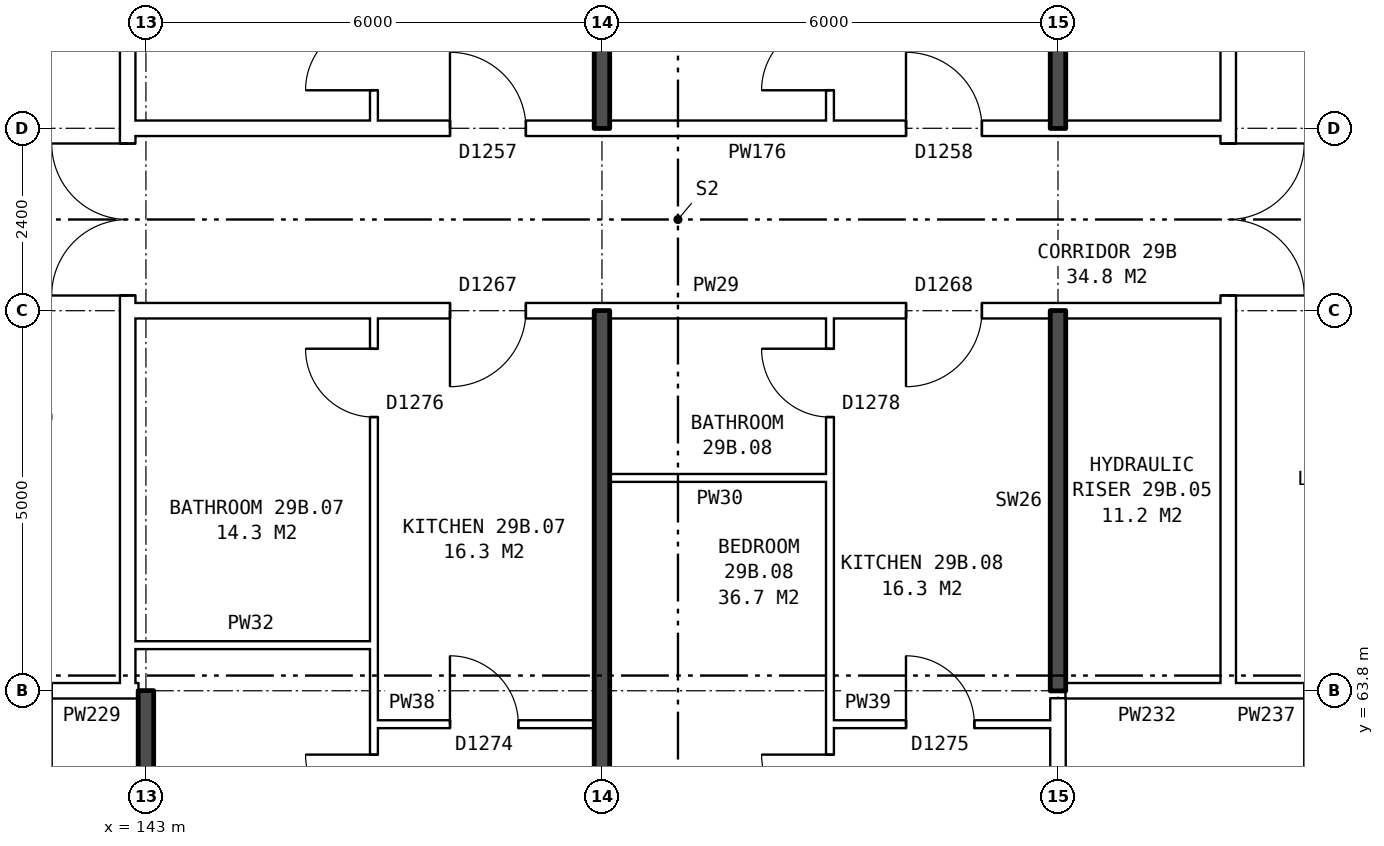
"""IFC4 building model, lengths in metres.
Left out: names, types, materials, properties, quantities, classifications, styles, units other than length and angle.
Written with IfcOpenShell. Run it as: python <this file> out.ifc"""

import sys

from ifc_helpers import new_model, si_unit, direction, frame, frame_2d, origin, place, context, subcontext, project, spatial, rectangle, extrude, element, fill, save


model = new_model("IFC4")
c1 = context("Model", 3, precision=1e-05, world=origin(), true_north=direction((0.0, 1.0)))
c2 = subcontext(c1, "Body", "Model", "MODEL_VIEW")
j1 = project(units=[si_unit("LENGTHUNIT", "METRE"), si_unit("PLANEANGLEUNIT", "RADIAN")], contexts=[c1])
p1 = place(None, origin())
s1 = spatial("IfcSite", under=j1, at=p1, CompositionType="ELEMENT")
p2 = place(p1, origin())
s2 = spatial("IfcBuilding", under=s1, at=p2, CompositionType="ELEMENT")
p3 = place(p2, frame((0.0, 0.0, 105.7)))
s3 = spatial("IfcBuildingStorey", under=s2, at=p3, CompositionType="ELEMENT", Elevation=105.7)
p4 = place(p3, frame((142.76, 63.9, 0.0), z_axis=(0.0, 0.0, 1.0), x_axis=(0.0, 1.0, 0.0)))
e1 = element("IfcWall", 1, at=p4, inside=s3, PredefinedType="PARTITIONING", context=c2, shape_type="SweptSolid", body=[
    extrude(rectangle(XDim=12.2, YDim=0.2, at=frame_2d((6.1, 0.0))), origin(), (0.0, 0.0, 1.0), 2.85),
])
p5 = place(p4, frame((5.1, 0.0, 0.0)))
e2 = element("IfcOpeningElement", 2, at=p5, cuts=e1, PredefinedType="OPENING", context=c2, shape_type="SweptSolid", body=[
    extrude(rectangle(XDim=2.0, YDim=2.1, at=frame_2d((1.0, 1.05))), frame((0.0, 0.11, 0.0), z_axis=(0.0, -1.0, 0.0), x_axis=(1.0, 0.0, 0.0)), (0.0, 0.0, 1.0), 0.22),
])
p6 = place(p3, frame((157.24, 63.9, 0.0), z_axis=(0.0, 0.0, 1.0), x_axis=(0.0, 1.0, 0.0)))
e3 = element("IfcWall", 3, at=p6, inside=s3, PredefinedType="PARTITIONING", context=c2, shape_type="SweptSolid", body=[
    extrude(rectangle(XDim=12.2, YDim=0.2, at=frame_2d((6.1, 0.0))), origin(), (0.0, 0.0, 1.0), 2.85),
])
p7 = place(p6, frame((5.1, 0.0, 0.0)))
e4 = element("IfcOpeningElement", 4, at=p7, cuts=e3, PredefinedType="OPENING", context=c2, shape_type="SweptSolid", body=[
    extrude(rectangle(XDim=2.0, YDim=2.1, at=frame_2d((1.0, 1.05))), frame((0.0, 0.11, 0.0), z_axis=(0.0, -1.0, 0.0), x_axis=(1.0, 0.0, 0.0)), (0.0, 0.0, 1.0), 0.22),
])
p8 = place(p3, frame((146.0, 63.36, 0.0), z_axis=(0.0, 0.0, 1.0), x_axis=(1.0, 0.0, 0.0)))
e5 = element("IfcWall", 5, at=p8, inside=s3, PredefinedType="PARTITIONING", context=c2, shape_type="SweptSolid", body=[
    extrude(rectangle(XDim=2.9, YDim=0.1, at=frame_2d((1.45, 0.0))), origin(), (0.0, 0.0, 1.0), 2.85),
])
p9 = place(p8, frame((1.0, 0.0, 0.0)))
e6 = element("IfcOpeningElement", 6, at=p9, cuts=e5, PredefinedType="OPENING", context=c2, shape_type="SweptSolid", body=[
    extrude(rectangle(XDim=0.9, YDim=2.1, at=frame_2d((0.45, 1.05))), frame((0.0, 0.06, 0.0), z_axis=(0.0, -1.0, 0.0), x_axis=(1.0, 0.0, 0.0)), (0.0, 0.0, 1.0), 0.12),
])
p10 = place(p3, frame((152.0, 63.36, 0.0), z_axis=(0.0, 0.0, 1.0), x_axis=(1.0, 0.0, 0.0)))
e7 = element("IfcWall", 7, at=p10, inside=s3, PredefinedType="PARTITIONING", context=c2, shape_type="SweptSolid", body=[
    extrude(rectangle(XDim=2.9, YDim=0.1, at=frame_2d((1.45, 0.0))), origin(), (0.0, 0.0, 1.0), 2.85),
])
p11 = place(p10, frame((1.0, 0.0, 0.0)))
e8 = element("IfcOpeningElement", 8, at=p11, cuts=e7, PredefinedType="OPENING", context=c2, shape_type="SweptSolid", body=[
    extrude(rectangle(XDim=0.9, YDim=2.1, at=frame_2d((0.45, 1.05))), frame((0.0, 0.06, 0.0), z_axis=(0.0, -1.0, 0.0), x_axis=(1.0, 0.0, 0.0)), (0.0, 0.0, 1.0), 0.12),
])
p12 = place(p3, frame((139.76, 63.8, 0.0), z_axis=(0.0, 0.0, 1.0), x_axis=(1.0, 0.0, 0.0)))
e9 = element("IfcWall", 9, at=p12, inside=s3, PredefinedType="PARTITIONING", context=c2, shape_type="SweptSolid", body=[
    extrude(rectangle(XDim=3.0, YDim=0.2, at=frame_2d((1.5, 0.0))), origin(), (0.0, 0.0, 1.0), 2.85),
])
p13 = place(p12, frame((1.0, 0.0, 0.0)))
e10 = element("IfcOpeningElement", 10, at=p13, cuts=e9, PredefinedType="OPENING", context=c2, shape_type="SweptSolid", body=[
    extrude(rectangle(XDim=1.0, YDim=2.1, at=frame_2d((0.5, 1.05))), frame((0.0, 0.11, 0.0), z_axis=(0.0, -1.0, 0.0), x_axis=(1.0, 0.0, 0.0)), (0.0, 0.0, 1.0), 0.22),
])
p14 = place(p3, frame((142.76, 63.8, 0.0), z_axis=(0.0, 0.0, 1.0), x_axis=(1.0, 0.0, 0.0)))
e11 = element("IfcWall", 11, at=p14, inside=s3, PredefinedType="PARTITIONING", context=c2, shape_type="SweptSolid", body=[
    extrude(rectangle(XDim=0.14, YDim=0.2, at=frame_2d((0.07, 0.0))), origin(), (0.0, 0.0, 1.0), 2.85),
])
p15 = place(p3, frame((155.1, 63.8, 0.0), z_axis=(0.0, 0.0, 1.0), x_axis=(1.0, 0.0, 0.0)))
e12 = element("IfcWall", 12, at=p15, inside=s3, PredefinedType="PARTITIONING", context=c2, shape_type="SweptSolid", body=[
    extrude(rectangle(XDim=2.14, YDim=0.2, at=frame_2d((1.07, 0.0))), origin(), (0.0, 0.0, 1.0), 2.85),
])
p16 = place(p3, frame((157.24, 63.8, 0.0), z_axis=(0.0, 0.0, 1.0), x_axis=(1.0, 0.0, 0.0)))
e13 = element("IfcWall", 13, at=p16, inside=s3, PredefinedType="PARTITIONING", context=c2, shape_type="SweptSolid", body=[
    extrude(rectangle(XDim=3.0, YDim=0.2, at=frame_2d((1.5, 0.0))), origin(), (0.0, 0.0, 1.0), 2.85),
])
p17 = place(p16, frame((1.0, 0.0, 0.0)))
e14 = element("IfcOpeningElement", 14, at=p17, cuts=e13, PredefinedType="OPENING", context=c2, shape_type="SweptSolid", body=[
    extrude(rectangle(XDim=1.0, YDim=2.1, at=frame_2d((0.5, 1.05))), frame((0.0, 0.11, 0.0), z_axis=(0.0, -1.0, 0.0), x_axis=(1.0, 0.0, 0.0)), (0.0, 0.0, 1.0), 0.22),
])
p18 = place(p3, frame((142.76, 64.4, 0.0), z_axis=(0.0, 0.0, 1.0), x_axis=(1.0, 0.0, 0.0)))
e15 = element("IfcWall", 15, at=p18, inside=s3, PredefinedType="PARTITIONING", context=c2, shape_type="SweptSolid", body=[
    extrude(rectangle(XDim=3.24, YDim=0.1, at=frame_2d((1.62, 0.0))), origin(), (0.0, 0.0, 1.0), 2.85),
])
p19 = place(p3, frame((149.1, 66.6, 0.0), z_axis=(0.0, 0.0, 1.0), x_axis=(1.0, 0.0, 0.0)))
e16 = element("IfcWall", 16, at=p19, inside=s3, PredefinedType="PARTITIONING", context=c2, shape_type="SweptSolid", body=[
    extrude(rectangle(XDim=2.9, YDim=0.1, at=frame_2d((1.45, 0.0))), origin(), (0.0, 0.0, 1.0), 2.85),
])
p20 = place(p3, frame((142.76, 68.8, 0.0), z_axis=(0.0, 0.0, 1.0), x_axis=(1.0, 0.0, 0.0)))
e17 = element("IfcWall", 17, at=p20, inside=s3, PredefinedType="PARTITIONING", context=c2, shape_type="SweptSolid", body=[
    extrude(rectangle(XDim=14.48, YDim=0.2, at=frame_2d((7.24, 0.0))), origin(), (0.0, 0.0, 1.0), 2.85),
])
p21 = place(p20, frame((4.24, 0.0, 0.0)))
e18 = element("IfcOpeningElement", 18, at=p21, cuts=e17, PredefinedType="OPENING", context=c2, shape_type="SweptSolid", body=[
    extrude(rectangle(XDim=1.0, YDim=2.1, at=frame_2d((0.5, 1.05))), frame((0.0, 0.11, 0.0), z_axis=(0.0, -1.0, 0.0), x_axis=(1.0, 0.0, 0.0)), (0.0, 0.0, 1.0), 0.22),
])
p22 = place(p20, frame((10.24, 0.0, 0.0)))
e19 = element("IfcOpeningElement", 19, at=p22, cuts=e17, PredefinedType="OPENING", context=c2, shape_type="SweptSolid", body=[
    extrude(rectangle(XDim=1.0, YDim=2.1, at=frame_2d((0.5, 1.05))), frame((0.0, 0.11, 0.0), z_axis=(0.0, -1.0, 0.0), x_axis=(1.0, 0.0, 0.0)), (0.0, 0.0, 1.0), 0.22),
])
p23 = place(p3, frame((142.76, 71.2, 0.0), z_axis=(0.0, 0.0, 1.0), x_axis=(1.0, 0.0, 0.0)))
e20 = element("IfcWall", 20, at=p23, inside=s3, PredefinedType="PARTITIONING", context=c2, shape_type="SweptSolid", body=[
    extrude(rectangle(XDim=14.48, YDim=0.2, at=frame_2d((7.24, 0.0))), origin(), (0.0, 0.0, 1.0), 2.85),
])
p24 = place(p23, frame((4.24, 0.0, 0.0)))
e21 = element("IfcOpeningElement", 21, at=p24, cuts=e20, PredefinedType="OPENING", context=c2, shape_type="SweptSolid", body=[
    extrude(rectangle(XDim=1.0, YDim=2.1, at=frame_2d((0.5, 1.05))), frame((0.0, 0.11, 0.0), z_axis=(0.0, -1.0, 0.0), x_axis=(1.0, 0.0, 0.0)), (0.0, 0.0, 1.0), 0.22),
])
p25 = place(p23, frame((10.24, 0.0, 0.0)))
e22 = element("IfcOpeningElement", 22, at=p25, cuts=e20, PredefinedType="OPENING", context=c2, shape_type="SweptSolid", body=[
    extrude(rectangle(XDim=1.0, YDim=2.1, at=frame_2d((0.5, 1.05))), frame((0.0, 0.11, 0.0), z_axis=(0.0, -1.0, 0.0), x_axis=(1.0, 0.0, 0.0)), (0.0, 0.0, 1.0), 0.22),
])
p26 = place(p3, frame((143.0, 54.36, 0.0), z_axis=(0.0, 0.0, 1.0), x_axis=(0.0, 1.0, 0.0)))
e23 = element("IfcWall", 23, at=p26, inside=s3, PredefinedType="SOLIDWALL", context=c2, shape_type="SweptSolid", body=[
    extrude(rectangle(XDim=9.44, YDim=0.2, at=frame_2d((4.72, 0.0))), origin(), (0.0, 0.0, 1.0), 2.85),
])
p27 = place(p3, frame((146.0, 54.36, 0.0), z_axis=(0.0, 0.0, 1.0), x_axis=(0.0, 1.0, 0.0)))
e24 = element("IfcWall", 24, at=p27, inside=s3, PredefinedType="PARTITIONING", context=c2, shape_type="SweptSolid", body=[
    extrude(rectangle(XDim=14.34, YDim=0.1, at=frame_2d((7.17, 0.0))), origin(), (0.0, 0.0, 1.0), 2.85),
])
p28 = place(p27, frame((7.7, 0.0, 0.0)))
e25 = element("IfcOpeningElement", 25, at=p28, cuts=e24, PredefinedType="OPENING", context=c2, shape_type="SweptSolid", body=[
    extrude(rectangle(XDim=0.9, YDim=2.1, at=frame_2d((0.45, 1.05))), frame((0.0, 0.06, 0.0), z_axis=(0.0, -1.0, 0.0), x_axis=(1.0, 0.0, 0.0)), (0.0, 0.0, 1.0), 0.12),
])
p29 = place(p27, frame((13.04, 0.0, 0.0)))
e26 = element("IfcOpeningElement", 26, at=p29, cuts=e24, PredefinedType="OPENING", context=c2, shape_type="SweptSolid", body=[
    extrude(rectangle(XDim=0.9, YDim=2.1, at=frame_2d((0.45, 1.05))), frame((0.0, 0.06, 0.0), z_axis=(0.0, -1.0, 0.0), x_axis=(1.0, 0.0, 0.0)), (0.0, 0.0, 1.0), 0.12),
])
p30 = place(p3, frame((146.0, 71.3, 0.0), z_axis=(0.0, 0.0, 1.0), x_axis=(0.0, 1.0, 0.0)))
e27 = element("IfcWall", 27, at=p30, inside=s3, PredefinedType="PARTITIONING", context=c2, shape_type="SweptSolid", body=[
    extrude(rectangle(XDim=14.34, YDim=0.1, at=frame_2d((7.17, 0.0))), origin(), (0.0, 0.0, 1.0), 2.85),
])
p31 = place(p30, frame((7.94, 0.0, 0.0)))
e28 = element("IfcOpeningElement", 28, at=p31, cuts=e27, PredefinedType="OPENING", context=c2, shape_type="SweptSolid", body=[
    extrude(rectangle(XDim=0.9, YDim=2.1, at=frame_2d((0.45, 1.05))), frame((0.0, 0.06, 0.0), z_axis=(0.0, -1.0, 0.0), x_axis=(1.0, 0.0, 0.0)), (0.0, 0.0, 1.0), 0.12),
])
p32 = place(p30, frame((0.4, 0.0, 0.0)))
e29 = element("IfcOpeningElement", 29, at=p32, cuts=e27, PredefinedType="OPENING", context=c2, shape_type="SweptSolid", body=[
    extrude(rectangle(XDim=0.9, YDim=2.1, at=frame_2d((0.45, 1.05))), frame((0.0, 0.06, 0.0), z_axis=(0.0, -1.0, 0.0), x_axis=(1.0, 0.0, 0.0)), (0.0, 0.0, 1.0), 0.12),
])
for number, where, z_axis, x_axis in (
    (30, (149.0, 54.36, 0.0), (0.0, 0.0, 1.0), (0.0, 1.0, 0.0)),
    (31, (149.0, 71.2, 0.0), (0.0, 0.0, 1.0), (0.0, 1.0, 0.0)),
):
    element("IfcWall", number, at=place(p3, frame(where, z_axis=z_axis, x_axis=x_axis)), inside=s3, PredefinedType="SOLIDWALL", context=c2, shape_type="SweptSolid", body=[
        extrude(rectangle(XDim=14.44, YDim=0.2, at=frame_2d((7.22, 0.0))), origin(), (0.0, 0.0, 1.0), 2.85),
    ])
p33 = place(p3, frame((152.0, 54.36, 0.0), z_axis=(0.0, 0.0, 1.0), x_axis=(0.0, 1.0, 0.0)))
e32 = element("IfcWall", 32, at=p33, inside=s3, PredefinedType="PARTITIONING", context=c2, shape_type="SweptSolid", body=[
    extrude(rectangle(XDim=14.34, YDim=0.1, at=frame_2d((7.17, 0.0))), origin(), (0.0, 0.0, 1.0), 2.85),
])
p34 = place(p33, frame((7.7, 0.0, 0.0)))
e33 = element("IfcOpeningElement", 33, at=p34, cuts=e32, PredefinedType="OPENING", context=c2, shape_type="SweptSolid", body=[
    extrude(rectangle(XDim=0.9, YDim=2.1, at=frame_2d((0.45, 1.05))), frame((0.0, 0.06, 0.0), z_axis=(0.0, -1.0, 0.0), x_axis=(1.0, 0.0, 0.0)), (0.0, 0.0, 1.0), 0.12),
])
p35 = place(p33, frame((13.04, 0.0, 0.0)))
e34 = element("IfcOpeningElement", 34, at=p35, cuts=e32, PredefinedType="OPENING", context=c2, shape_type="SweptSolid", body=[
    extrude(rectangle(XDim=0.9, YDim=2.1, at=frame_2d((0.45, 1.05))), frame((0.0, 0.06, 0.0), z_axis=(0.0, -1.0, 0.0), x_axis=(1.0, 0.0, 0.0)), (0.0, 0.0, 1.0), 0.12),
])
p36 = place(p3, frame((152.0, 71.3, 0.0), z_axis=(0.0, 0.0, 1.0), x_axis=(0.0, 1.0, 0.0)))
e35 = element("IfcWall", 35, at=p36, inside=s3, PredefinedType="PARTITIONING", context=c2, shape_type="SweptSolid", body=[
    extrude(rectangle(XDim=14.34, YDim=0.1, at=frame_2d((7.17, 0.0))), origin(), (0.0, 0.0, 1.0), 2.85),
])
p37 = place(p36, frame((9.24, 0.0, 0.0)))
e36 = element("IfcOpeningElement", 36, at=p37, cuts=e35, PredefinedType="OPENING", context=c2, shape_type="SweptSolid", body=[
    extrude(rectangle(XDim=0.9, YDim=2.1, at=frame_2d((0.45, 1.05))), frame((0.0, 0.06, 0.0), z_axis=(0.0, -1.0, 0.0), x_axis=(1.0, 0.0, 0.0)), (0.0, 0.0, 1.0), 0.12),
])
p38 = place(p36, frame((0.4, 0.0, 0.0)))
e37 = element("IfcOpeningElement", 37, at=p38, cuts=e35, PredefinedType="OPENING", context=c2, shape_type="SweptSolid", body=[
    extrude(rectangle(XDim=0.9, YDim=2.1, at=frame_2d((0.45, 1.05))), frame((0.0, 0.06, 0.0), z_axis=(0.0, -1.0, 0.0), x_axis=(1.0, 0.0, 0.0)), (0.0, 0.0, 1.0), 0.12),
])
p39 = place(p3, frame((155.0, 61.5, 0.0), z_axis=(0.0, 0.0, 1.0), x_axis=(0.0, 1.0, 0.0)))
e38 = element("IfcWall", 38, at=p39, inside=s3, PredefinedType="PARTITIONING", context=c2, shape_type="SweptSolid", body=[
    extrude(rectangle(XDim=2.2, YDim=0.2, at=frame_2d((1.1, 0.0))), origin(), (0.0, 0.0, 1.0), 2.85),
])
for number, where, z_axis, x_axis in (
    (39, (155.0, 63.8, 0.0), (0.0, 0.0, 1.0), (0.0, 1.0, 0.0)),
    (40, (155.0, 71.2, 0.0), (0.0, 0.0, 1.0), (0.0, 1.0, 0.0)),
):
    element("IfcWall", number, at=place(p3, frame(where, z_axis=z_axis, x_axis=x_axis)), inside=s3, PredefinedType="SOLIDWALL", context=c2, shape_type="SweptSolid", body=[
        extrude(rectangle(XDim=5.0, YDim=0.2, at=frame_2d((2.5, 0.0))), origin(), (0.0, 0.0, 1.0), 2.85),
    ])
p40 = place(p5, origin())
e41 = element("IfcDoor", 41, at=p40, inside=s3, OperationType="DOUBLE_DOOR_SINGLE_SWING", PredefinedType="DOOR", context=c2, shape_type="SweptSolid", body=[
    extrude(rectangle(XDim=2.0, YDim=2.1, at=frame_2d((1.0, 1.05))), frame((0.0, 0.025, 0.0), z_axis=(0.0, -1.0, 0.0), x_axis=(1.0, 0.0, 0.0)), (0.0, 0.0, 1.0), 0.05),
])
fill(e2, e41)
p41 = place(p7, frame((2.0, 0.0, 0.0), z_axis=(0.0, 0.0, 1.0), x_axis=(-1.0, 0.0, 0.0)))
e42 = element("IfcDoor", 42, at=p41, inside=s3, OperationType="DOUBLE_DOOR_SINGLE_SWING", PredefinedType="DOOR", context=c2, shape_type="SweptSolid", body=[
    extrude(rectangle(XDim=2.0, YDim=2.1, at=frame_2d((1.0, 1.05))), frame((0.0, 0.025, 0.0), z_axis=(0.0, -1.0, 0.0), x_axis=(1.0, 0.0, 0.0)), (0.0, 0.0, 1.0), 0.05),
])
fill(e4, e42)
p42 = place(p28, origin())
e43 = element("IfcDoor", 43, at=p42, inside=s3, OperationType="SINGLE_SWING_RIGHT", PredefinedType="DOOR", context=c2, shape_type="SweptSolid", body=[
    extrude(rectangle(XDim=0.9, YDim=2.1, at=frame_2d((0.45, 1.05))), frame((0.0, 0.025, 0.0), z_axis=(0.0, -1.0, 0.0), x_axis=(1.0, 0.0, 0.0)), (0.0, 0.0, 1.0), 0.05),
])
fill(e25, e43)
p43 = place(p21, frame((1.0, 0.0, 0.0), z_axis=(0.0, 0.0, 1.0), x_axis=(-1.0, 0.0, 0.0)))
e44 = element("IfcDoor", 44, at=p43, inside=s3, OperationType="SINGLE_SWING_RIGHT", PredefinedType="DOOR", context=c2, shape_type="SweptSolid", body=[
    extrude(rectangle(XDim=1.0, YDim=2.1, at=frame_2d((0.5, 1.05))), frame((0.0, 0.025, 0.0), z_axis=(0.0, -1.0, 0.0), x_axis=(1.0, 0.0, 0.0)), (0.0, 0.0, 1.0), 0.05),
])
fill(e18, e44)
p44 = place(p9, origin())
e45 = element("IfcDoor", 45, at=p44, inside=s3, OperationType="SINGLE_SWING_LEFT", PredefinedType="DOOR", context=c2, shape_type="SweptSolid", body=[
    extrude(rectangle(XDim=0.9, YDim=2.1, at=frame_2d((0.45, 1.05))), frame((0.0, 0.025, 0.0), z_axis=(0.0, -1.0, 0.0), x_axis=(1.0, 0.0, 0.0)), (0.0, 0.0, 1.0), 0.05),
])
fill(e6, e45)
p45 = place(p29, origin())
e46 = element("IfcDoor", 46, at=p45, inside=s3, OperationType="SINGLE_SWING_RIGHT", PredefinedType="DOOR", context=c2, shape_type="SweptSolid", body=[
    extrude(rectangle(XDim=0.9, YDim=2.1, at=frame_2d((0.45, 1.05))), frame((0.0, 0.025, 0.0), z_axis=(0.0, -1.0, 0.0), x_axis=(1.0, 0.0, 0.0)), (0.0, 0.0, 1.0), 0.05),
])
fill(e26, e46)
p46 = place(p34, origin())
e47 = element("IfcDoor", 47, at=p46, inside=s3, OperationType="SINGLE_SWING_RIGHT", PredefinedType="DOOR", context=c2, shape_type="SweptSolid", body=[
    extrude(rectangle(XDim=0.9, YDim=2.1, at=frame_2d((0.45, 1.05))), frame((0.0, 0.025, 0.0), z_axis=(0.0, -1.0, 0.0), x_axis=(1.0, 0.0, 0.0)), (0.0, 0.0, 1.0), 0.05),
])
fill(e33, e47)
p47 = place(p22, frame((1.0, 0.0, 0.0), z_axis=(0.0, 0.0, 1.0), x_axis=(-1.0, 0.0, 0.0)))
e48 = element("IfcDoor", 48, at=p47, inside=s3, OperationType="SINGLE_SWING_RIGHT", PredefinedType="DOOR", context=c2, shape_type="SweptSolid", body=[
    extrude(rectangle(XDim=1.0, YDim=2.1, at=frame_2d((0.5, 1.05))), frame((0.0, 0.025, 0.0), z_axis=(0.0, -1.0, 0.0), x_axis=(1.0, 0.0, 0.0)), (0.0, 0.0, 1.0), 0.05),
])
fill(e19, e48)
p48 = place(p11, origin())
e49 = element("IfcDoor", 49, at=p48, inside=s3, OperationType="SINGLE_SWING_LEFT", PredefinedType="DOOR", context=c2, shape_type="SweptSolid", body=[
    extrude(rectangle(XDim=0.9, YDim=2.1, at=frame_2d((0.45, 1.05))), frame((0.0, 0.025, 0.0), z_axis=(0.0, -1.0, 0.0), x_axis=(1.0, 0.0, 0.0)), (0.0, 0.0, 1.0), 0.05),
])
fill(e8, e49)
p49 = place(p35, origin())
e50 = element("IfcDoor", 50, at=p49, inside=s3, OperationType="SINGLE_SWING_RIGHT", PredefinedType="DOOR", context=c2, shape_type="SweptSolid", body=[
    extrude(rectangle(XDim=0.9, YDim=2.1, at=frame_2d((0.45, 1.05))), frame((0.0, 0.025, 0.0), z_axis=(0.0, -1.0, 0.0), x_axis=(1.0, 0.0, 0.0)), (0.0, 0.0, 1.0), 0.05),
])
fill(e34, e50)
p50 = place(p24, origin())
e51 = element("IfcDoor", 51, at=p50, inside=s3, OperationType="SINGLE_SWING_LEFT", PredefinedType="DOOR", context=c2, shape_type="SweptSolid", body=[
    extrude(rectangle(XDim=1.0, YDim=2.1, at=frame_2d((0.5, 1.05))), frame((0.0, 0.025, 0.0), z_axis=(0.0, -1.0, 0.0), x_axis=(1.0, 0.0, 0.0)), (0.0, 0.0, 1.0), 0.05),
])
fill(e21, e51)
p51 = place(p32, origin())
e52 = element("IfcDoor", 52, at=p51, inside=s3, OperationType="SINGLE_SWING_LEFT", PredefinedType="DOOR", context=c2, shape_type="SweptSolid", body=[
    extrude(rectangle(XDim=0.9, YDim=2.1, at=frame_2d((0.45, 1.05))), frame((0.0, 0.025, 0.0), z_axis=(0.0, -1.0, 0.0), x_axis=(1.0, 0.0, 0.0)), (0.0, 0.0, 1.0), 0.05),
])
fill(e29, e52)
p52 = place(p25, origin())
e53 = element("IfcDoor", 53, at=p52, inside=s3, OperationType="SINGLE_SWING_LEFT", PredefinedType="DOOR", context=c2, shape_type="SweptSolid", body=[
    extrude(rectangle(XDim=1.0, YDim=2.1, at=frame_2d((0.5, 1.05))), frame((0.0, 0.025, 0.0), z_axis=(0.0, -1.0, 0.0), x_axis=(1.0, 0.0, 0.0)), (0.0, 0.0, 1.0), 0.05),
])
fill(e22, e53)
p53 = place(p38, origin())
e54 = element("IfcDoor", 54, at=p53, inside=s3, OperationType="SINGLE_SWING_LEFT", PredefinedType="DOOR", context=c2, shape_type="SweptSolid", body=[
    extrude(rectangle(XDim=0.9, YDim=2.1, at=frame_2d((0.45, 1.05))), frame((0.0, 0.025, 0.0), z_axis=(0.0, -1.0, 0.0), x_axis=(1.0, 0.0, 0.0)), (0.0, 0.0, 1.0), 0.05),
])
fill(e37, e54)
save(model, sys.argv[1])
